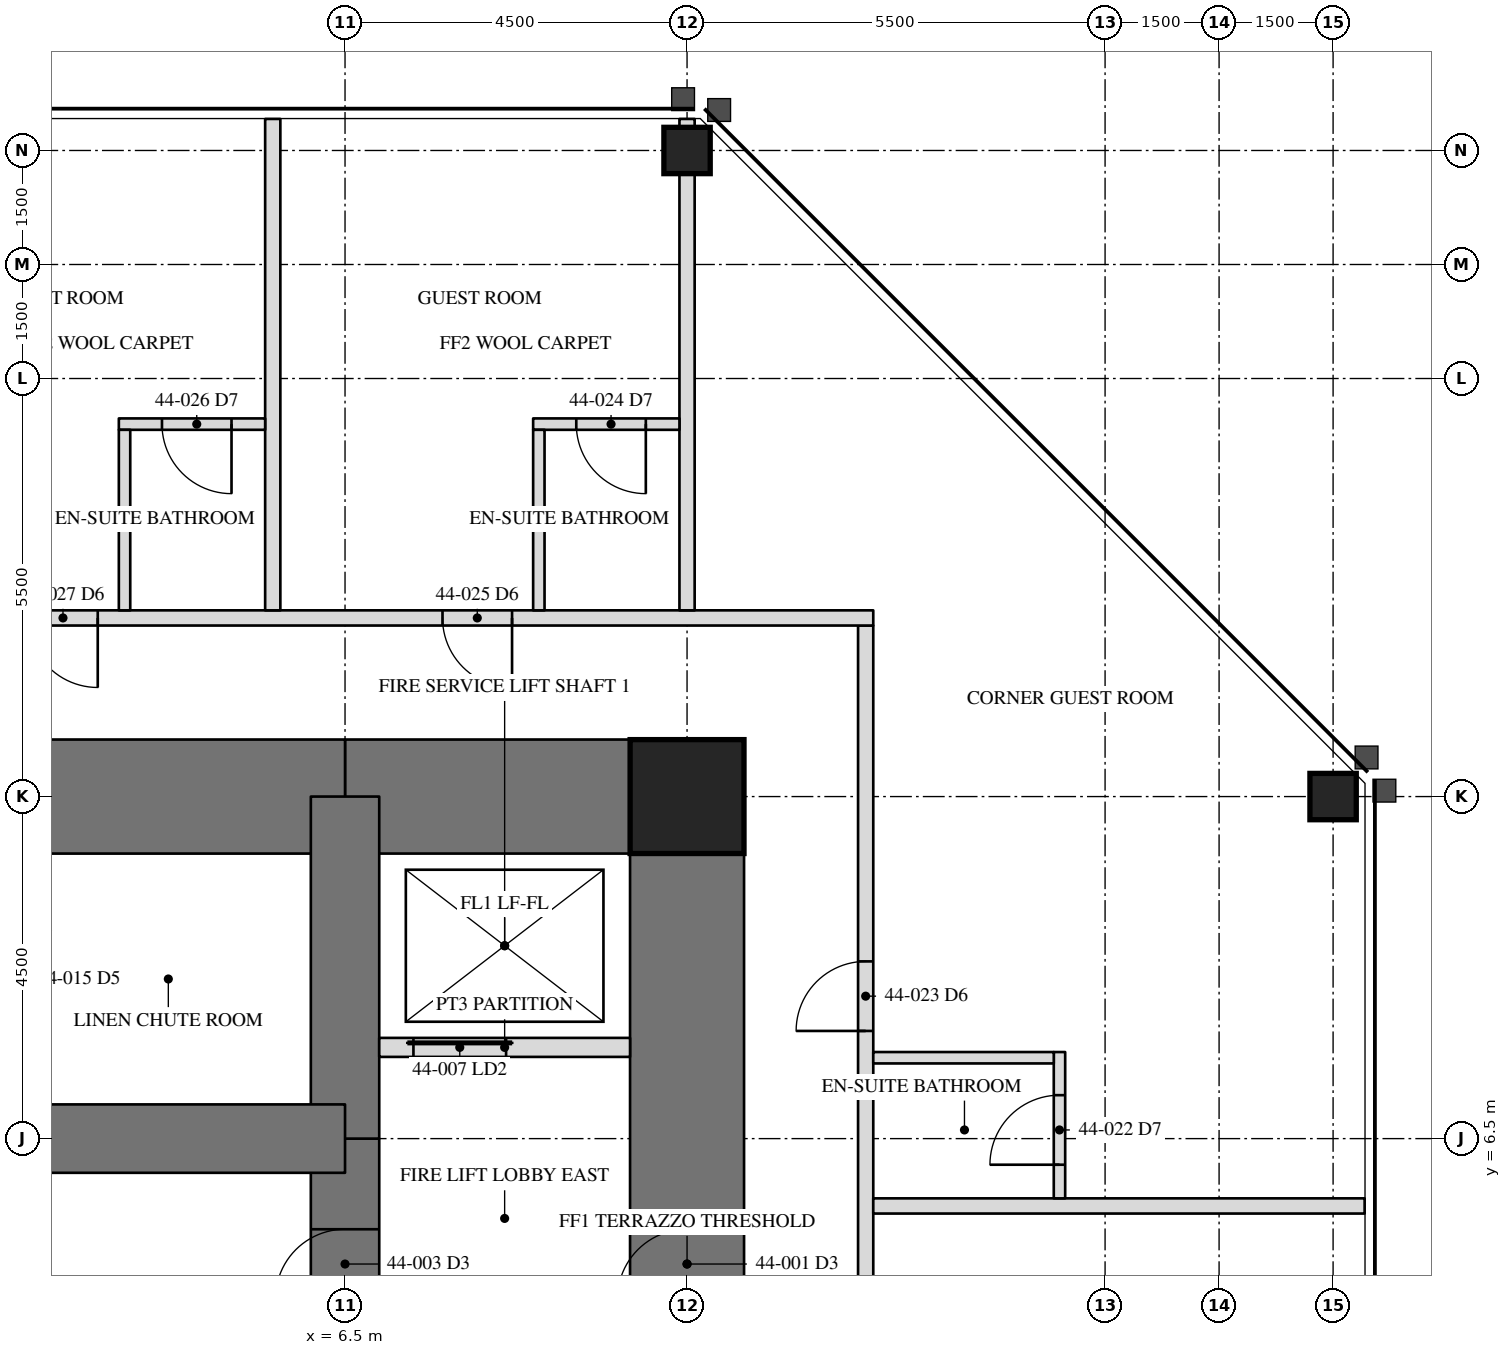
"""IFC4 building model, lengths in metres.
Left out: names, types, materials, properties, quantities, classifications, styles, units other than length and angle.
Written with IfcOpenShell. Run it as: python <this file> out.ifc"""

import sys

from ifc_helpers import new_model, si_unit, direction, frame, frame_2d, origin, origin_2d, place, context, subcontext, project, spatial, rectangle, hollow_rectangle, extrude, element, fill, save


model = new_model("IFC4")
c1 = context("Model", 3, precision=1e-05, world=origin(), true_north=direction((0.0, 1.0)))
c2 = subcontext(c1, "Body", "Model", "MODEL_VIEW")
j1 = project(units=[si_unit("LENGTHUNIT", "METRE"), si_unit("PLANEANGLEUNIT", "RADIAN")], contexts=[c1])
p1 = place(None, origin())
s1 = spatial("IfcSite", under=j1, at=p1, CompositionType="ELEMENT")
p2 = place(p1, origin())
s2 = spatial("IfcBuilding", under=s1, at=p2, CompositionType="ELEMENT")
p3 = place(p2, frame((0.0, 0.0, 190.7)))
s3 = spatial("IfcBuildingStorey", under=s2, at=p3, CompositionType="ELEMENT", Elevation=190.7)
for number, where, z_axis, x_axis in (
    (1, (19.5, 11.0, 0.0), (0.0, 0.0, 1.0), (0.0, 1.0, 0.0)),
    (2, (11.0, 19.5, 0.0), (0.0, 0.0, 1.0), (1.0, 0.0, 0.0)),
):
    element("IfcColumn", number, at=place(p3, frame(where, z_axis=z_axis, x_axis=x_axis)), inside=s3, PredefinedType="COLUMN", context=c2, shape_type="SweptSolid", body=[
        extrude(hollow_rectangle(XDim=0.61, YDim=0.61, WallThickness=0.076, at=origin_2d()), origin(), (0.0, 0.0, 1.0), 3.5),
    ])
p4 = place(p3, frame((11.0, -11.0, 0.0), z_axis=(0.0, 0.0, 1.0), x_axis=(0.0, 1.0, 0.0)))
e3 = element("IfcWall", 3, at=p4, inside=s3, PredefinedType="SHEAR", context=c2, shape_type="SweptSolid", body=[
    extrude(rectangle(XDim=22.0, YDim=1.5, at=frame_2d((11.0, 0.0))), origin(), (0.0, 0.0, 1.0), 3.5),
])
p5 = place(p4, frame((15.393, 0.0, 0.0)))
e4 = element("IfcOpeningElement", 4, at=p5, cuts=e3, PredefinedType="OPENING", context=c2, shape_type="SweptSolid", body=[
    extrude(rectangle(XDim=0.915, YDim=2.134, at=frame_2d((0.458, 1.067))), frame((0.0, 0.76, 0.0), z_axis=(0.0, -1.0, 0.0), x_axis=(1.0, 0.0, 0.0)), (0.0, 0.0, 1.0), 1.52),
])
p6 = place(p3, frame((11.0, 11.0, 0.0), z_axis=(0.0, 0.0, 1.0), x_axis=(-1.0, 0.0, 0.0)))
e5 = element("IfcWall", 5, at=p6, inside=s3, PredefinedType="SHEAR", context=c2, shape_type="SweptSolid", body=[
    extrude(rectangle(XDim=4.5, YDim=1.5, at=frame_2d((2.25, 0.0))), origin(), (0.0, 0.0, 1.0), 3.5),
])
p7 = place(p3, frame((6.5, 11.0, 0.0), z_axis=(0.0, 0.0, 1.0), x_axis=(-1.0, 0.0, 0.0)))
e6 = element("IfcWall", 6, at=p7, inside=s3, PredefinedType="SHEAR", context=c2, shape_type="SweptSolid", body=[
    extrude(rectangle(XDim=13.0, YDim=1.5, at=frame_2d((6.5, 0.0))), origin(), (0.0, 0.0, 1.0), 3.5),
])
p8 = place(p7, frame((6.042, 0.0, 0.0)))
e7 = element("IfcOpeningElement", 7, at=p8, cuts=e6, PredefinedType="OPENING", context=c2, shape_type="SweptSolid", body=[
    extrude(rectangle(XDim=0.915, YDim=2.134, at=frame_2d((0.458, 1.067))), frame((0.0, 0.76, 0.0), z_axis=(0.0, -1.0, 0.0), x_axis=(1.0, 0.0, 0.0)), (0.0, 0.0, 1.0), 1.52),
])
p9 = place(p3, frame((6.5, -6.5, 0.0), z_axis=(0.0, 0.0, 1.0), x_axis=(0.0, 1.0, 0.0)))
e8 = element("IfcWall", 8, at=p9, inside=s3, PredefinedType="SHEAR", context=c2, shape_type="SweptSolid", body=[
    extrude(rectangle(XDim=13.0, YDim=0.9, at=frame_2d((6.5, 0.0))), origin(), (0.0, 0.0, 1.0), 3.5),
])
p10 = place(p9, frame((10.893, 0.0, 0.0)))
e9 = element("IfcOpeningElement", 9, at=p10, cuts=e8, PredefinedType="OPENING", context=c2, shape_type="SweptSolid", body=[
    extrude(rectangle(XDim=0.915, YDim=2.134, at=frame_2d((0.458, 1.067))), frame((0.0, 0.46, 0.0), z_axis=(0.0, -1.0, 0.0), x_axis=(1.0, 0.0, 0.0)), (0.0, 0.0, 1.0), 0.92),
])
p11 = place(p9, frame((0.61, 0.0, 0.0)))
e10 = element("IfcOpeningElement", 10, at=p11, cuts=e8, PredefinedType="OPENING", context=c2, shape_type="SweptSolid", body=[
    extrude(rectangle(XDim=0.915, YDim=2.134, at=frame_2d((0.458, 1.067))), frame((0.0, 0.46, 0.0), z_axis=(0.0, -1.0, 0.0), x_axis=(1.0, 0.0, 0.0)), (0.0, 0.0, 1.0), 0.92),
])
p12 = place(p3, frame((6.5, 6.5, 0.0), z_axis=(0.0, 0.0, 1.0), x_axis=(0.0, 1.0, 0.0)))
e11 = element("IfcWall", 11, at=p12, inside=s3, PredefinedType="SHEAR", context=c2, shape_type="SweptSolid", body=[
    extrude(rectangle(XDim=4.5, YDim=0.9, at=frame_2d((2.25, 0.0))), origin(), (0.0, 0.0, 1.0), 3.5),
])
p13 = place(p3, frame((6.5, 6.5, 0.0), z_axis=(0.0, 0.0, 1.0), x_axis=(-1.0, 0.0, 0.0)))
e12 = element("IfcWall", 12, at=p13, inside=s3, PredefinedType="SHEAR", context=c2, shape_type="SweptSolid", body=[
    extrude(rectangle(XDim=13.0, YDim=0.9, at=frame_2d((6.5, 0.0))), origin(), (0.0, 0.0, 1.0), 3.5),
])
p14 = place(p3, frame((11.0, 11.0, 0.0), z_axis=(0.0, 0.0, 1.0), x_axis=(1.0, 0.0, 0.0)))
e13 = element("IfcColumn", 13, at=p14, inside=s3, PredefinedType="COLUMN", context=c2, shape_type="SweptSolid", body=[
    extrude(hollow_rectangle(XDim=1.499, YDim=1.499, WallThickness=0.102, at=origin_2d()), origin(), (0.0, 0.0, 1.0), 3.5),
])
p15 = place(p3, frame((6.95, 7.7, 0.0), z_axis=(0.0, 0.0, 1.0), x_axis=(1.0, 0.0, 0.0)))
e14 = element("IfcWall", 14, at=p15, inside=s3, PredefinedType="PARTITIONING", context=c2, shape_type="SweptSolid", body=[
    extrude(rectangle(XDim=3.3, YDim=0.25, at=frame_2d((1.65, 0.0))), origin(), (0.0, 0.0, 1.0), 3.31),
])
p16 = place(p15, frame((0.45, 0.0, 0.0)))
e15 = element("IfcOpeningElement", 15, at=p16, cuts=e14, PredefinedType="OPENING", context=c2, shape_type="SweptSolid", body=[
    extrude(rectangle(XDim=1.219, YDim=2.134, at=frame_2d((0.609, 1.067))), frame((0.0, 0.135, 0.0), z_axis=(0.0, -1.0, 0.0), x_axis=(1.0, 0.0, 0.0)), (0.0, 0.0, 1.0), 0.27),
])
p17 = place(p3, frame((13.35, -13.45, 0.0), z_axis=(0.0, 0.0, 1.0), x_axis=(0.0, 1.0, 0.0)))
e16 = element("IfcWall", 16, at=p17, inside=s3, PredefinedType="PARTITIONING", context=c2, shape_type="SweptSolid", body=[
    extrude(rectangle(XDim=26.7, YDim=0.2, at=frame_2d((13.35, 0.0))), origin(), (0.0, 0.0, 1.0), 3.31),
])
p18 = place(p17, frame((5.353, 0.0, 0.0)))
e17 = element("IfcOpeningElement", 17, at=p18, cuts=e16, PredefinedType="OPENING", context=c2, shape_type="SweptSolid", body=[
    extrude(rectangle(XDim=0.915, YDim=2.134, at=frame_2d((0.458, 1.067))), frame((0.0, 0.11, 0.0), z_axis=(0.0, -1.0, 0.0), x_axis=(1.0, 0.0, 0.0)), (0.0, 0.0, 1.0), 0.22),
])
p19 = place(p17, frame((10.204, 0.0, 0.0)))
e18 = element("IfcOpeningElement", 18, at=p19, cuts=e16, PredefinedType="OPENING", context=c2, shape_type="SweptSolid", body=[
    extrude(rectangle(XDim=0.915, YDim=2.134, at=frame_2d((0.458, 1.067))), frame((0.0, 0.11, 0.0), z_axis=(0.0, -1.0, 0.0), x_axis=(1.0, 0.0, 0.0)), (0.0, 0.0, 1.0), 0.22),
])
p20 = place(p17, frame((15.752, 0.0, 0.0)))
e19 = element("IfcOpeningElement", 19, at=p20, cuts=e16, PredefinedType="OPENING", context=c2, shape_type="SweptSolid", body=[
    extrude(rectangle(XDim=0.915, YDim=2.134, at=frame_2d((0.458, 1.067))), frame((0.0, 0.11, 0.0), z_axis=(0.0, -1.0, 0.0), x_axis=(1.0, 0.0, 0.0)), (0.0, 0.0, 1.0), 0.22),
])
p21 = place(p17, frame((21.366, 0.0, 0.0)))
e20 = element("IfcOpeningElement", 20, at=p21, cuts=e16, PredefinedType="OPENING", context=c2, shape_type="SweptSolid", body=[
    extrude(rectangle(XDim=0.915, YDim=2.134, at=frame_2d((0.458, 1.067))), frame((0.0, 0.11, 0.0), z_axis=(0.0, -1.0, 0.0), x_axis=(1.0, 0.0, 0.0)), (0.0, 0.0, 1.0), 0.22),
])
p22 = place(p3, frame((13.45, 13.35, 0.0), z_axis=(0.0, 0.0, 1.0), x_axis=(-1.0, 0.0, 0.0)))
e21 = element("IfcWall", 21, at=p22, inside=s3, PredefinedType="PARTITIONING", context=c2, shape_type="SweptSolid", body=[
    extrude(rectangle(XDim=26.7, YDim=0.2, at=frame_2d((13.35, 0.0))), origin(), (0.0, 0.0, 1.0), 3.31),
])
p23 = place(p22, frame((4.752, 0.0, 0.0)))
e22 = element("IfcOpeningElement", 22, at=p23, cuts=e21, PredefinedType="OPENING", context=c2, shape_type="SweptSolid", body=[
    extrude(rectangle(XDim=0.915, YDim=2.134, at=frame_2d((0.458, 1.067))), frame((0.0, 0.11, 0.0), z_axis=(0.0, -1.0, 0.0), x_axis=(1.0, 0.0, 0.0)), (0.0, 0.0, 1.0), 0.22),
])
p24 = place(p22, frame((10.204, 0.0, 0.0)))
e23 = element("IfcOpeningElement", 23, at=p24, cuts=e21, PredefinedType="OPENING", context=c2, shape_type="SweptSolid", body=[
    extrude(rectangle(XDim=0.915, YDim=2.134, at=frame_2d((0.458, 1.067))), frame((0.0, 0.11, 0.0), z_axis=(0.0, -1.0, 0.0), x_axis=(1.0, 0.0, 0.0)), (0.0, 0.0, 1.0), 0.22),
])
p25 = place(p22, frame((15.752, 0.0, 0.0)))
e24 = element("IfcOpeningElement", 24, at=p25, cuts=e21, PredefinedType="OPENING", context=c2, shape_type="SweptSolid", body=[
    extrude(rectangle(XDim=0.915, YDim=2.134, at=frame_2d((0.458, 1.067))), frame((0.0, 0.11, 0.0), z_axis=(0.0, -1.0, 0.0), x_axis=(1.0, 0.0, 0.0)), (0.0, 0.0, 1.0), 0.22),
])
p26 = place(p22, frame((21.366, 0.0, 0.0)))
e25 = element("IfcOpeningElement", 25, at=p26, cuts=e21, PredefinedType="OPENING", context=c2, shape_type="SweptSolid", body=[
    extrude(rectangle(XDim=0.915, YDim=2.134, at=frame_2d((0.458, 1.067))), frame((0.0, 0.11, 0.0), z_axis=(0.0, -1.0, 0.0), x_axis=(1.0, 0.0, 0.0)), (0.0, 0.0, 1.0), 0.22),
])
p27 = place(p3, frame((13.45, 5.614, 0.0), z_axis=(0.0, 0.0, 1.0), x_axis=(1.0, 0.0, 0.0)))
e26 = element("IfcWall", 26, at=p27, inside=s3, PredefinedType="PARTITIONING", context=c2, shape_type="SweptSolid", body=[
    extrude(rectangle(XDim=6.465, YDim=0.2, at=frame_2d((3.232, 0.0))), origin(), (0.0, 0.0, 1.0), 3.31),
])
p28 = place(p3, frame((15.9, 5.714, 0.0), z_axis=(0.0, 0.0, 1.0), x_axis=(0.0, 1.0, 0.0)))
e27 = element("IfcWall", 27, at=p28, inside=s3, PredefinedType="PARTITIONING", context=c2, shape_type="SweptSolid", body=[
    extrude(rectangle(XDim=1.925, YDim=0.15, at=frame_2d((0.962, 0.0))), origin(), (0.0, 0.0, 1.0), 3.31),
])
p29 = place(p28, frame((0.442, 0.0, 0.0)))
e28 = element("IfcOpeningElement", 28, at=p29, cuts=e27, PredefinedType="OPENING", context=c2, shape_type="SweptSolid", body=[
    extrude(rectangle(XDim=0.915, YDim=2.032, at=frame_2d((0.458, 1.016))), frame((0.0, 0.085, 0.0), z_axis=(0.0, -1.0, 0.0), x_axis=(1.0, 0.0, 0.0)), (0.0, 0.0, 1.0), 0.17),
])
p30 = place(p3, frame((13.45, 7.564, 0.0), z_axis=(0.0, 0.0, 1.0), x_axis=(1.0, 0.0, 0.0)))
e29 = element("IfcWall", 29, at=p30, inside=s3, PredefinedType="PARTITIONING", context=c2, shape_type="SweptSolid", body=[
    extrude(rectangle(XDim=2.375, YDim=0.15, at=frame_2d((1.188, 0.0))), origin(), (0.0, 0.0, 1.0), 3.31),
])
p31 = place(p3, frame((11.0, 13.45, 0.0), z_axis=(0.0, 0.0, 1.0), x_axis=(0.0, 1.0, 0.0)))
e30 = element("IfcWall", 30, at=p31, inside=s3, PredefinedType="PARTITIONING", context=c2, shape_type="SweptSolid", body=[
    extrude(rectangle(XDim=6.465, YDim=0.2, at=frame_2d((3.232, 0.0))), origin(), (0.0, 0.0, 1.0), 2.802),
])
p32 = place(p3, frame((5.549, 13.45, 0.0), z_axis=(0.0, 0.0, 1.0), x_axis=(0.0, 1.0, 0.0)))
e31 = element("IfcWall", 31, at=p32, inside=s3, PredefinedType="PARTITIONING", context=c2, shape_type="SweptSolid", body=[
    extrude(rectangle(XDim=6.465, YDim=0.2, at=frame_2d((3.232, 0.0))), origin(), (0.0, 0.0, 1.0), 3.31),
])
p33 = place(p3, frame((10.9, 15.9, 0.0), z_axis=(0.0, 0.0, 1.0), x_axis=(-1.0, 0.0, 0.0)))
e32 = element("IfcWall", 32, at=p33, inside=s3, PredefinedType="PARTITIONING", context=c2, shape_type="SweptSolid", body=[
    extrude(rectangle(XDim=1.925, YDim=0.15, at=frame_2d((0.962, 0.0))), origin(), (0.0, 0.0, 1.0), 3.31),
])
p34 = place(p33, frame((0.442, 0.0, 0.0)))
e33 = element("IfcOpeningElement", 33, at=p34, cuts=e32, PredefinedType="OPENING", context=c2, shape_type="SweptSolid", body=[
    extrude(rectangle(XDim=0.915, YDim=2.032, at=frame_2d((0.458, 1.016))), frame((0.0, 0.085, 0.0), z_axis=(0.0, -1.0, 0.0), x_axis=(1.0, 0.0, 0.0)), (0.0, 0.0, 1.0), 0.17),
])
p35 = place(p3, frame((9.05, 13.45, 0.0), z_axis=(0.0, 0.0, 1.0), x_axis=(0.0, 1.0, 0.0)))
e34 = element("IfcWall", 34, at=p35, inside=s3, PredefinedType="PARTITIONING", context=c2, shape_type="SweptSolid", body=[
    extrude(rectangle(XDim=2.375, YDim=0.15, at=frame_2d((1.188, 0.0))), origin(), (0.0, 0.0, 1.0), 3.31),
])
p36 = place(p3, frame((5.449, 15.9, 0.0), z_axis=(0.0, 0.0, 1.0), x_axis=(-1.0, 0.0, 0.0)))
e35 = element("IfcWall", 35, at=p36, inside=s3, PredefinedType="PARTITIONING", context=c2, shape_type="SweptSolid", body=[
    extrude(rectangle(XDim=1.925, YDim=0.15, at=frame_2d((0.962, 0.0))), origin(), (0.0, 0.0, 1.0), 3.31),
])
p37 = place(p36, frame((0.442, 0.0, 0.0)))
e36 = element("IfcOpeningElement", 36, at=p37, cuts=e35, PredefinedType="OPENING", context=c2, shape_type="SweptSolid", body=[
    extrude(rectangle(XDim=0.915, YDim=2.032, at=frame_2d((0.458, 1.016))), frame((0.0, 0.085, 0.0), z_axis=(0.0, -1.0, 0.0), x_axis=(1.0, 0.0, 0.0)), (0.0, 0.0, 1.0), 0.17),
])
p38 = place(p3, frame((3.599, 13.45, 0.0), z_axis=(0.0, 0.0, 1.0), x_axis=(0.0, 1.0, 0.0)))
e37 = element("IfcWall", 37, at=p38, inside=s3, PredefinedType="PARTITIONING", context=c2, shape_type="SweptSolid", body=[
    extrude(rectangle(XDim=2.375, YDim=0.15, at=frame_2d((1.188, 0.0))), origin(), (0.0, 0.0, 1.0), 2.703),
])
p39 = place(p5, origin())
e38 = element("IfcDoor", 38, at=p39, inside=s3, OperationType="SINGLE_SWING_RIGHT", PredefinedType="DOOR", context=c2, shape_type="SweptSolid", body=[
    extrude(rectangle(XDim=0.915, YDim=2.134, at=frame_2d((0.458, 1.067))), frame((0.0, -0.675, 0.0), z_axis=(0.0, -1.0, 0.0), x_axis=(1.0, 0.0, 0.0)), (0.0, 0.0, 1.0), 0.05),
])
fill(e4, e38)
p40 = place(p10, origin())
e39 = element("IfcDoor", 39, at=p40, inside=s3, OperationType="SINGLE_SWING_RIGHT", PredefinedType="DOOR", context=c2, shape_type="SweptSolid", body=[
    extrude(rectangle(XDim=0.915, YDim=2.134, at=frame_2d((0.458, 1.067))), frame((0.0, -0.375, 0.0), z_axis=(0.0, -1.0, 0.0), x_axis=(1.0, 0.0, 0.0)), (0.0, 0.0, 1.0), 0.05),
])
fill(e9, e39)
p41 = place(p16, origin())
e40 = element("IfcDoor", 40, at=p41, inside=s3, OperationType="SLIDING_TO_LEFT", PredefinedType="DOOR", context=c2, shape_type="SweptSolid", body=[
    extrude(rectangle(XDim=1.219, YDim=2.134, at=frame_2d((0.609, 1.067))), frame((0.0, 0.025, 0.0), z_axis=(0.0, -1.0, 0.0), x_axis=(1.0, 0.0, 0.0)), (0.0, 0.0, 1.0), 0.05),
])
fill(e15, e40)
p42 = place(p29, origin())
e41 = element("IfcDoor", 41, at=p42, inside=s3, OperationType="SINGLE_SWING_LEFT", PredefinedType="DOOR", context=c2, shape_type="SweptSolid", body=[
    extrude(rectangle(XDim=0.915, YDim=2.032, at=frame_2d((0.458, 1.016))), frame((0.0, 0.025, 0.0), z_axis=(0.0, -1.0, 0.0), x_axis=(1.0, 0.0, 0.0)), (0.0, 0.0, 1.0), 0.05),
])
fill(e28, e41)
p43 = place(p21, origin())
e42 = element("IfcDoor", 42, at=p43, inside=s3, OperationType="SINGLE_SWING_LEFT", PredefinedType="DOOR", context=c2, shape_type="SweptSolid", body=[
    extrude(rectangle(XDim=0.915, YDim=2.134, at=frame_2d((0.458, 1.067))), frame((0.0, 0.025, 0.0), z_axis=(0.0, -1.0, 0.0), x_axis=(1.0, 0.0, 0.0)), (0.0, 0.0, 1.0), 0.05),
])
fill(e20, e42)
p44 = place(p34, origin())
e43 = element("IfcDoor", 43, at=p44, inside=s3, OperationType="SINGLE_SWING_LEFT", PredefinedType="DOOR", context=c2, shape_type="SweptSolid", body=[
    extrude(rectangle(XDim=0.915, YDim=2.032, at=frame_2d((0.458, 1.016))), frame((0.0, 0.025, 0.0), z_axis=(0.0, -1.0, 0.0), x_axis=(1.0, 0.0, 0.0)), (0.0, 0.0, 1.0), 0.05),
])
fill(e33, e43)
p45 = place(p23, origin())
e44 = element("IfcDoor", 44, at=p45, inside=s3, OperationType="SINGLE_SWING_LEFT", PredefinedType="DOOR", context=c2, shape_type="SweptSolid", body=[
    extrude(rectangle(XDim=0.915, YDim=2.134, at=frame_2d((0.458, 1.067))), frame((0.0, 0.025, 0.0), z_axis=(0.0, -1.0, 0.0), x_axis=(1.0, 0.0, 0.0)), (0.0, 0.0, 1.0), 0.05),
])
fill(e22, e44)
p46 = place(p37, origin())
e45 = element("IfcDoor", 45, at=p46, inside=s3, OperationType="SINGLE_SWING_LEFT", PredefinedType="DOOR", context=c2, shape_type="SweptSolid", body=[
    extrude(rectangle(XDim=0.915, YDim=2.032, at=frame_2d((0.458, 1.016))), frame((0.0, 0.025, 0.0), z_axis=(0.0, -1.0, 0.0), x_axis=(1.0, 0.0, 0.0)), (0.0, 0.0, 1.0), 0.05),
])
fill(e36, e45)
p47 = place(p24, origin())
e46 = element("IfcDoor", 46, at=p47, inside=s3, OperationType="SINGLE_SWING_LEFT", PredefinedType="DOOR", context=c2, shape_type="SweptSolid", body=[
    extrude(rectangle(XDim=0.915, YDim=2.134, at=frame_2d((0.458, 1.067))), frame((0.0, 0.025, 0.0), z_axis=(0.0, -1.0, 0.0), x_axis=(1.0, 0.0, 0.0)), (0.0, 0.0, 1.0), 0.05),
])
fill(e23, e46)
save(model, sys.argv[1])
